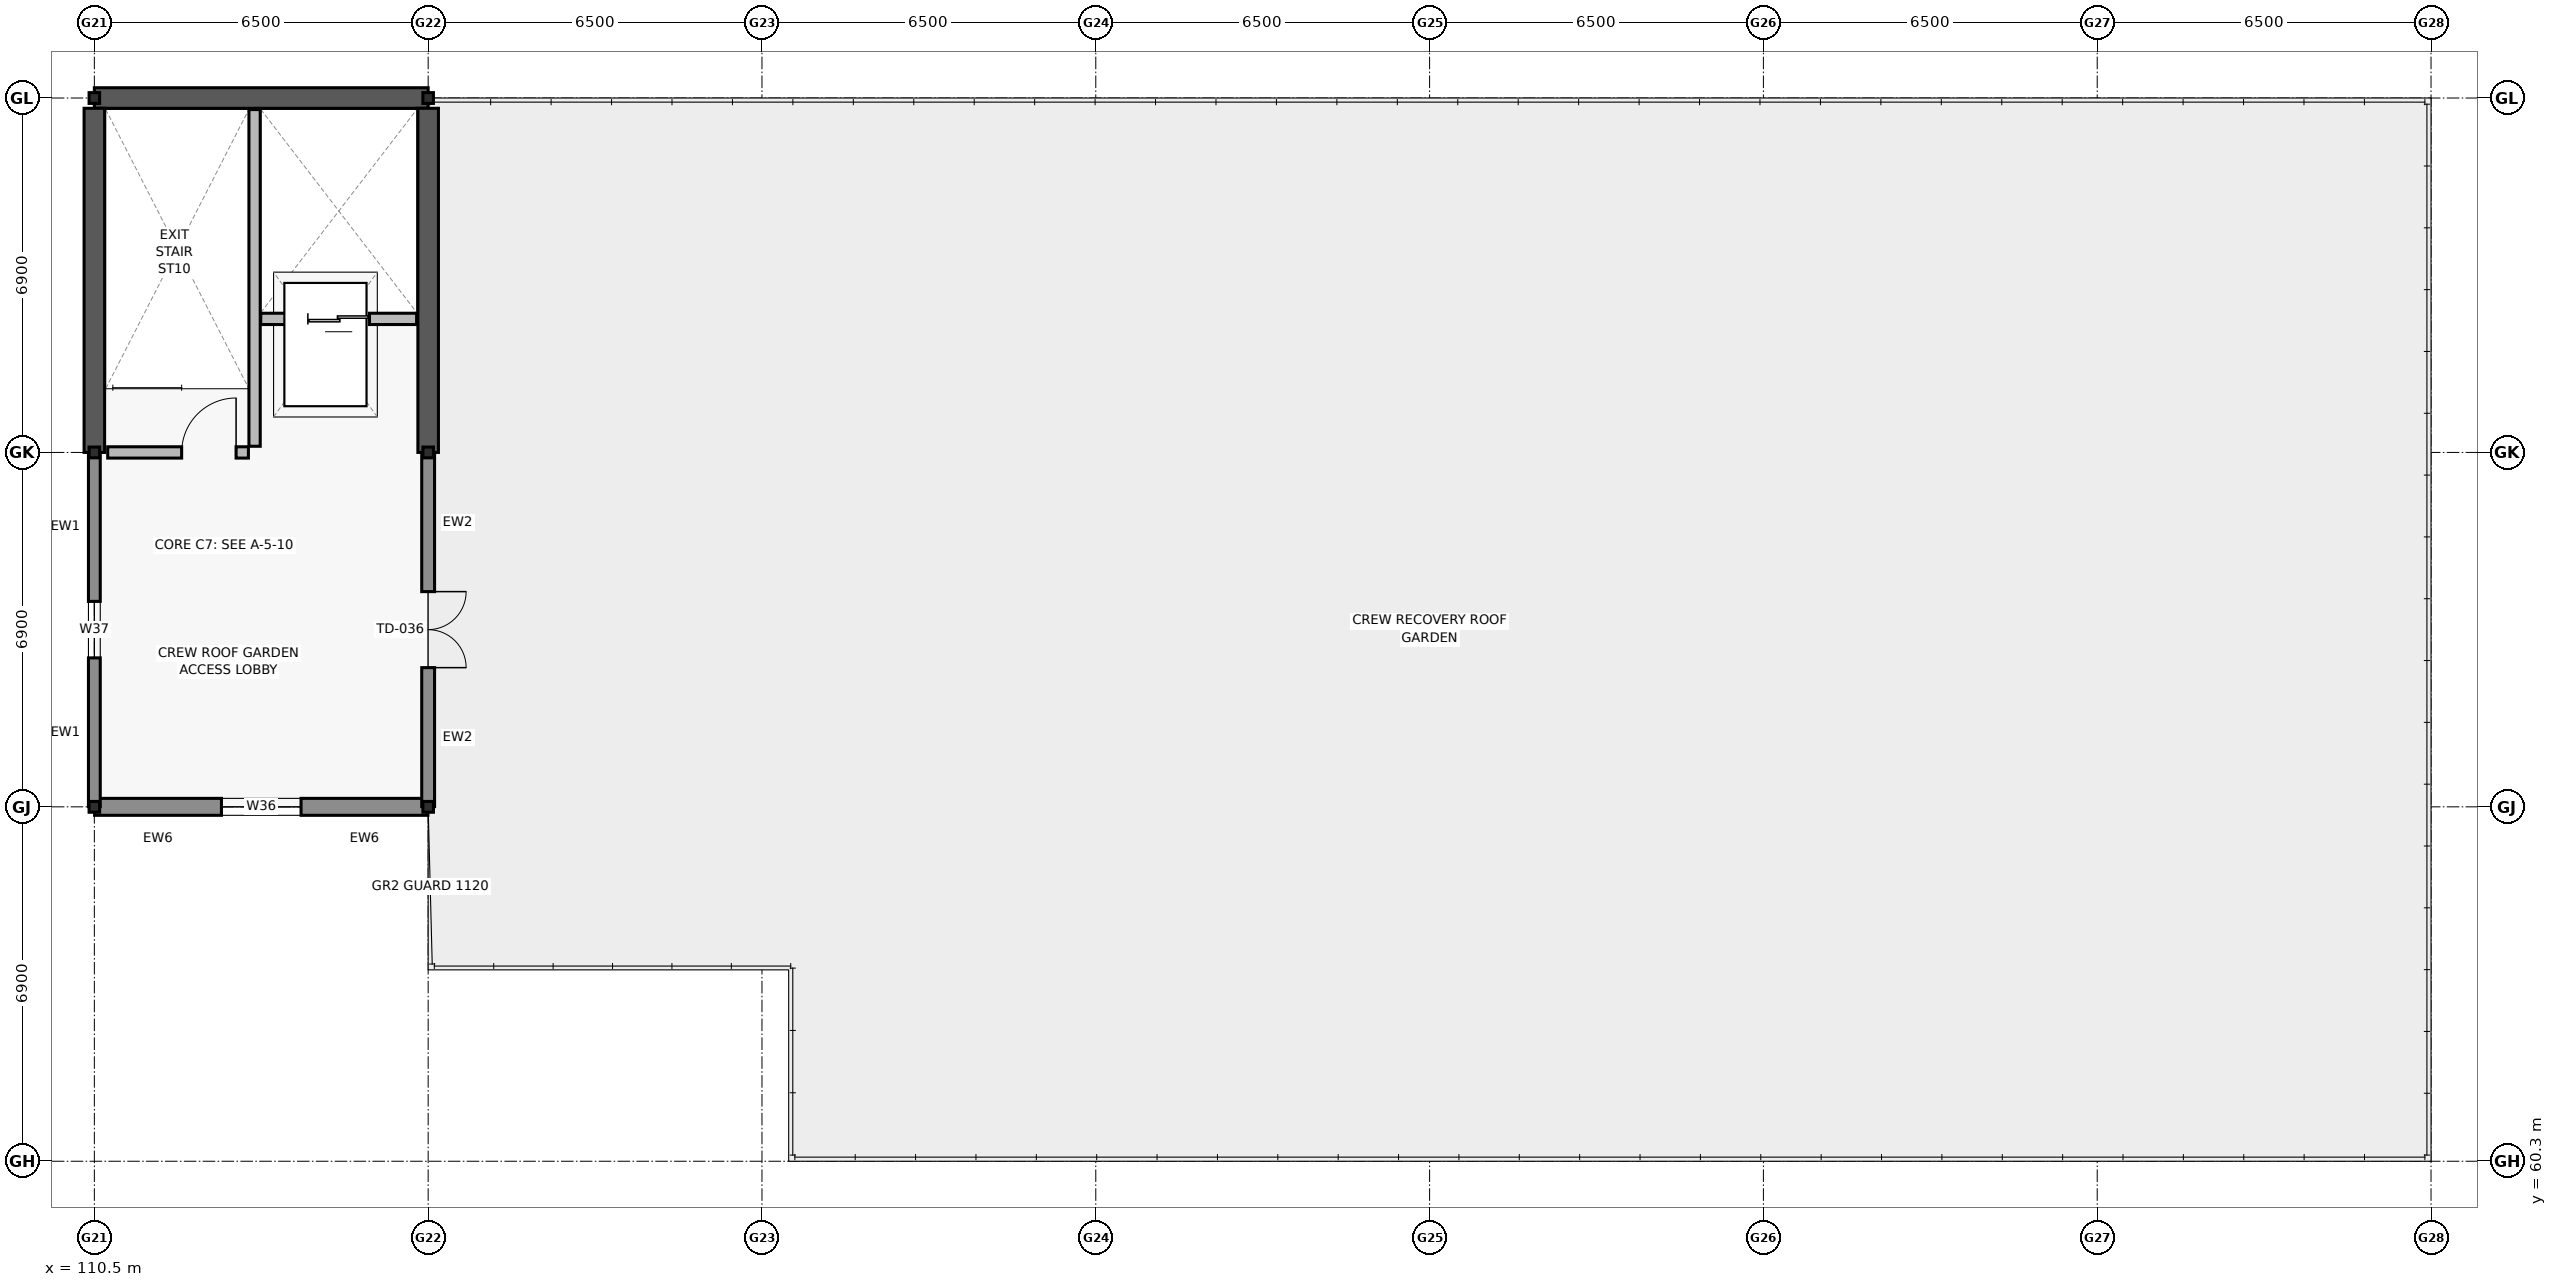
"""IFC4 building model, lengths in metres.
Left out: names, types, materials, properties, quantities, classifications, styles, units other than length and angle.
Written with IfcOpenShell. Run it as: python <this file> out.ifc"""

import sys

from ifc_helpers import new_model, si_unit, direction, frame, frame_2d, origin, origin_2d, place, context, subcontext, project, spatial, rectangle, i_section, extrude, element, fill, save


model = new_model("IFC4")
c1 = context("Model", 3, precision=1e-05, world=origin(), true_north=direction((0.0, 1.0)))
c2 = subcontext(c1, "Body", "Model", "MODEL_VIEW")
j1 = project(units=[si_unit("LENGTHUNIT", "METRE"), si_unit("PLANEANGLEUNIT", "RADIAN")], contexts=[c1])
p1 = place(None, origin())
s1 = spatial("IfcSite", under=j1, at=p1, CompositionType="ELEMENT")
p2 = place(p1, origin())
s2 = spatial("IfcBuilding", under=s1, at=p2, CompositionType="ELEMENT")
p3 = place(p2, frame((0.0, 0.0, 17.4)))
s3 = spatial("IfcBuildingStorey", under=s2, at=p3, CompositionType="ELEMENT", Elevation=17.4)
for number, where, z_axis, x_axis in (
    (1, (110.5, 67.2, 0.0), (0.0, 0.0, 1.0), (1.0, 0.0, 0.0)),
    (2, (110.5, 74.1, 0.0), (0.0, 0.0, 1.0), (1.0, 0.0, 0.0)),
    (3, (110.5, 81.0, 0.0), (0.0, 0.0, 1.0), (1.0, 0.0, 0.0)),
    (4, (117.0, 67.2, 0.0), (0.0, 0.0, 1.0), (1.0, 0.0, 0.0)),
    (5, (117.0, 74.1, 0.0), (0.0, 0.0, 1.0), (1.0, 0.0, 0.0)),
    (6, (117.0, 81.0, 0.0), (0.0, 0.0, 1.0), (1.0, 0.0, 0.0)),
):
    element("IfcColumn", number, at=place(p3, frame(where, z_axis=z_axis, x_axis=x_axis)), inside=s3, PredefinedType="COLUMN", context=c2, shape_type="SweptSolid", body=[
        extrude(i_section(OverallWidth=0.205, OverallDepth=0.21, WebThickness=0.009, FlangeThickness=0.014, FilletRadius=0.011, at=origin_2d()), origin(), (0.0, 0.0, 1.0), 3.9),
    ])
p4 = place(p3, frame((110.5, 81.0, 0.0), z_axis=(0.0, 0.0, 1.0), x_axis=(1.0, 0.0, 0.0)))
e7 = element("IfcWall", 7, at=p4, inside=s3, PredefinedType="SHEAR", context=c2, shape_type="SweptSolid", body=[
    extrude(rectangle(XDim=6.5, YDim=0.4, at=frame_2d((3.25, 0.0))), origin(), (0.0, 0.0, 1.0), 3.66),
])
for number, where, z_axis, x_axis in (
    (8, (110.5, 74.1, 0.0), (0.0, 0.0, 1.0), (0.0, 1.0, 0.0)),
    (9, (117.0, 74.1, 0.0), (0.0, 0.0, 1.0), (0.0, 1.0, 0.0)),
):
    element("IfcWall", number, at=place(p3, frame(where, z_axis=z_axis, x_axis=x_axis)), inside=s3, PredefinedType="SHEAR", context=c2, shape_type="SweptSolid", body=[
        extrude(rectangle(XDim=6.7, YDim=0.4, at=frame_2d((3.35, 0.0))), origin(), (0.0, 0.0, 1.0), 3.66),
    ])
p5 = place(p3, frame((116.995, 67.2, 0.0), z_axis=(0.0, 0.0, 1.0), x_axis=(-1.0, 0.0, 0.0)))
e10 = element("IfcWall", 10, at=p5, inside=s3, PredefinedType="SOLIDWALL", context=c2, shape_type="SweptSolid", body=[
    extrude(rectangle(XDim=6.49, YDim=0.33, at=frame_2d((3.245, 0.0))), origin(), (0.0, 0.0, 1.0), 3.02),
])
p6 = place(p5, frame((2.47, 0.0, 0.8)))
e11 = element("IfcOpeningElement", 11, at=p6, cuts=e10, PredefinedType="OPENING", context=c2, shape_type="SweptSolid", body=[
    extrude(rectangle(XDim=1.55, YDim=1.5, at=frame_2d((0.775, 0.75))), frame((0.0, 0.175, 0.0), z_axis=(0.0, -1.0, 0.0), x_axis=(1.0, 0.0, 0.0)), (0.0, 0.0, 1.0), 0.35),
])
p7 = place(p3, frame((110.5, 67.205, 0.0), z_axis=(0.0, 0.0, 1.0), x_axis=(0.0, 1.0, 0.0)))
e12 = element("IfcWall", 12, at=p7, inside=s3, PredefinedType="SOLIDWALL", context=c2, shape_type="SweptSolid", body=[
    extrude(rectangle(XDim=6.89, YDim=0.23, at=frame_2d((3.445, 0.0))), origin(), (0.0, 0.0, 1.0), 3.02),
])
p8 = place(p7, frame((2.895, 0.0, 0.8)))
e13 = element("IfcOpeningElement", 13, at=p8, cuts=e12, PredefinedType="OPENING", context=c2, shape_type="SweptSolid", body=[
    extrude(rectangle(XDim=1.1, YDim=1.65, at=frame_2d((0.55, 0.825))), frame((0.0, 0.125, 0.0), z_axis=(0.0, -1.0, 0.0), x_axis=(1.0, 0.0, 0.0)), (0.0, 0.0, 1.0), 0.25),
])
p9 = place(p3, frame((117.0, 74.095, 0.0), z_axis=(0.0, 0.0, 1.0), x_axis=(0.0, -1.0, 0.0)))
e14 = element("IfcWall", 14, at=p9, inside=s3, PredefinedType="SOLIDWALL", context=c2, shape_type="SweptSolid", body=[
    extrude(rectangle(XDim=6.89, YDim=0.25, at=frame_2d((3.445, 0.0))), origin(), (0.0, 0.0, 1.0), 3.02),
])
p10 = place(p9, frame((2.705, 0.0, 0.0)))
e15 = element("IfcOpeningElement", 15, at=p10, cuts=e14, PredefinedType="OPENING", context=c2, shape_type="SweptSolid", body=[
    extrude(rectangle(XDim=1.48, YDim=2.16, at=frame_2d((0.74, 1.08))), frame((0.0, 0.135, 0.0), z_axis=(0.0, -1.0, 0.0), x_axis=(1.0, 0.0, 0.0)), (0.0, 0.0, 1.0), 0.27),
])
p11 = place(p3, frame((113.62, 74.22, 0.0), z_axis=(0.0, 0.0, 1.0), x_axis=(0.0, 1.0, 0.0)))
e16 = element("IfcWall", 16, at=p11, inside=s3, PredefinedType="SOLIDWALL", context=c2, shape_type="SweptSolid", body=[
    extrude(rectangle(XDim=6.555, YDim=0.22, at=frame_2d((3.277, 0.0))), origin(), (0.0, 0.0, 1.0), 3.02),
])
p12 = place(p3, frame((110.76, 74.1, 0.0), z_axis=(0.0, 0.0, 1.0), x_axis=(1.0, 0.0, 0.0)))
e17 = element("IfcWall", 17, at=p12, inside=s3, PredefinedType="SOLIDWALL", context=c2, shape_type="SweptSolid", body=[
    extrude(rectangle(XDim=2.74, YDim=0.22, at=frame_2d((1.37, 0.0))), origin(), (0.0, 0.0, 1.0), 3.02),
])
p13 = place(p12, frame((1.44, 0.0, 0.0)))
e18 = element("IfcOpeningElement", 18, at=p13, cuts=e17, PredefinedType="OPENING", context=c2, shape_type="SweptSolid", body=[
    extrude(rectangle(XDim=1.06, YDim=2.1, at=frame_2d((0.53, 1.05))), frame((0.0, 0.12, 0.0), z_axis=(0.0, -1.0, 0.0), x_axis=(1.0, 0.0, 0.0)), (0.0, 0.0, 1.0), 0.24),
])
p14 = place(p3, frame((113.74, 76.7, 0.0), z_axis=(0.0, 0.0, 1.0), x_axis=(1.0, 0.0, 0.0)))
e19 = element("IfcWall", 19, at=p14, inside=s3, PredefinedType="SOLIDWALL", context=c2, shape_type="SweptSolid", body=[
    extrude(rectangle(XDim=3.035, YDim=0.22, at=frame_2d((1.518, 0.0))), origin(), (0.0, 0.0, 1.0), 3.02),
])
p15 = place(p14, frame((0.917, 0.0, 0.0)))
e20 = element("IfcOpeningElement", 20, at=p15, cuts=e19, PredefinedType="OPENING", context=c2, shape_type="SweptSolid", body=[
    extrude(rectangle(XDim=1.2, YDim=2.15, at=frame_2d((0.6, 1.075))), frame((0.0, 0.12, 0.0), z_axis=(0.0, -1.0, 0.0), x_axis=(1.0, 0.0, 0.0)), (0.0, 0.0, 1.0), 0.24),
])
p16 = place(p6, origin())
e21 = element("IfcWindow", 21, at=p16, inside=s3, PartitioningType="SINGLE_PANEL", PredefinedType="WINDOW", context=c2, shape_type="SweptSolid", body=[
    extrude(rectangle(XDim=1.55, YDim=1.5, at=frame_2d((0.775, 0.75))), frame((0.0, 0.03, 0.0), z_axis=(0.0, -1.0, 0.0), x_axis=(1.0, 0.0, 0.0)), (0.0, 0.0, 1.0), 0.06),
])
fill(e11, e21)
p17 = place(p8, origin())
e22 = element("IfcWindow", 22, at=p17, inside=s3, PartitioningType="SINGLE_PANEL", PredefinedType="WINDOW", context=c2, shape_type="SweptSolid", body=[
    extrude(rectangle(XDim=1.1, YDim=1.65, at=frame_2d((0.55, 0.825))), frame((0.0, 0.03, 0.0), z_axis=(0.0, -1.0, 0.0), x_axis=(1.0, 0.0, 0.0)), (0.0, 0.0, 1.0), 0.06),
])
fill(e13, e22)
p18 = place(p10, origin())
e23 = element("IfcDoor", 23, at=p18, inside=s3, OperationType="DOUBLE_DOOR_SINGLE_SWING", PredefinedType="DOOR", context=c2, shape_type="SweptSolid", body=[
    extrude(rectangle(XDim=1.48, YDim=2.16, at=frame_2d((0.74, 1.08))), frame((0.0, 0.025, 0.0), z_axis=(0.0, -1.0, 0.0), x_axis=(1.0, 0.0, 0.0)), (0.0, 0.0, 1.0), 0.05),
])
fill(e15, e23)
p19 = place(p13, origin())
e24 = element("IfcDoor", 24, at=p19, inside=s3, OperationType="SINGLE_SWING_RIGHT", PredefinedType="DOOR", context=c2, shape_type="SweptSolid", body=[
    extrude(rectangle(XDim=1.06, YDim=2.1, at=frame_2d((0.53, 1.05))), frame((0.0, 0.025, 0.0), z_axis=(0.0, -1.0, 0.0), x_axis=(1.0, 0.0, 0.0)), (0.0, 0.0, 1.0), 0.05),
])
fill(e18, e24)
p20 = place(p15, origin())
e25 = element("IfcDoor", 25, at=p20, inside=s3, OperationType="DOUBLE_DOOR_SLIDING", PredefinedType="DOOR", context=c2, shape_type="SweptSolid", body=[
    extrude(rectangle(XDim=1.2, YDim=2.15, at=frame_2d((0.6, 1.075))), frame((0.0, 0.025, 0.0), z_axis=(0.0, -1.0, 0.0), x_axis=(1.0, 0.0, 0.0)), (0.0, 0.0, 1.0), 0.05),
])
fill(e20, e25)
save(model, sys.argv[1])
